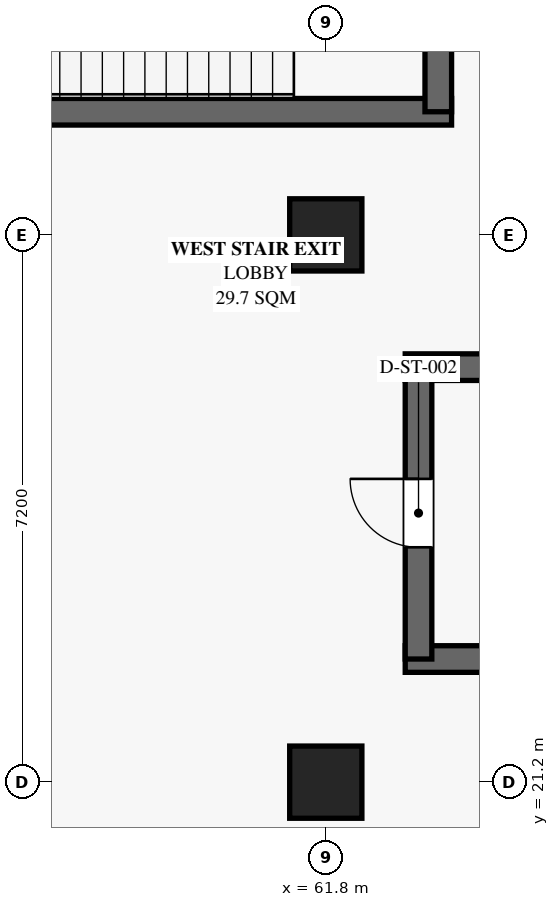
"""IFC4 building model, lengths in metres.
Left out: names, types, materials, properties, quantities, classifications, styles, units other than length and angle.
Written with IfcOpenShell. Run it as: python <this file> out.ifc"""

import sys

from ifc_helpers import new_model, si_unit, direction, frame, frame_2d, origin, origin_2d, place, context, subcontext, project, spatial, rectangle, extrude, element, fill, save


model = new_model("IFC4")
c1 = context("Model", 3, precision=1e-05, world=origin(), true_north=direction((0.0, 1.0)))
c2 = subcontext(c1, "Body", "Model", "MODEL_VIEW")
j1 = project(units=[si_unit("LENGTHUNIT", "METRE"), si_unit("PLANEANGLEUNIT", "RADIAN")], contexts=[c1])
p1 = place(None, origin())
s1 = spatial("IfcSite", under=j1, at=p1, CompositionType="ELEMENT")
p2 = place(p1, origin())
s2 = spatial("IfcBuilding", under=s1, at=p2, CompositionType="ELEMENT")
p3 = place(p2, origin())
s3 = spatial("IfcBuildingStorey", under=s2, at=p3, CompositionType="ELEMENT", Elevation=0.0)
for number, where, z_axis, x_axis in (
    (1, (61.8, 21.2, 0.0), (0.0, 0.0, 1.0), (1.0, 0.0, 0.0)),
    (2, (61.8, 28.4, 0.0), (0.0, 0.0, 1.0), (1.0, 0.0, 0.0)),
):
    element("IfcColumn", number, at=place(p3, frame(where, z_axis=z_axis, x_axis=x_axis)), inside=s3, PredefinedType="COLUMN", context=c2, shape_type="SweptSolid", body=[
        extrude(rectangle(XDim=0.95, YDim=0.95, at=origin_2d()), origin(), (0.0, 0.0, 1.0), 5.4),
    ])
for number, where, z_axis, x_axis in (
    (3, (70.855, 22.82, 0.0), (0.0, 0.0, 1.0), (-1.0, 0.0, 0.0)),
    (4, (62.845, 26.66, 0.0), (0.0, 0.0, 1.0), (1.0, 0.0, 0.0)),
):
    element("IfcWall", number, at=place(p3, frame(where, z_axis=z_axis, x_axis=x_axis)), inside=s3, PredefinedType="SHEAR", context=c2, shape_type="SweptSolid", body=[
        extrude(rectangle(XDim=8.01, YDim=0.35, at=frame_2d((4.005, 0.0))), origin(), (0.0, 0.0, 1.0), 5.13),
    ])
p4 = place(p3, frame((63.02, 22.82, 0.0), z_axis=(0.0, 0.0, 1.0), x_axis=(0.0, 1.0, 0.0)))
e5 = element("IfcWall", 5, at=p4, inside=s3, PredefinedType="SHEAR", context=c2, shape_type="SweptSolid", body=[
    extrude(rectangle(XDim=3.84, YDim=0.35, at=frame_2d((1.92, 0.0))), origin(), (0.0, 0.0, 1.0), 5.13),
])
p5 = place(p4, frame((1.47, 0.0, 0.0)))
e6 = element("IfcOpeningElement", 6, at=p5, cuts=e5, PredefinedType="OPENING", context=c2, shape_type="SweptSolid", body=[
    extrude(rectangle(XDim=0.9, YDim=2.18, at=frame_2d((0.45, 1.09))), frame((0.0, 0.185, 0.0), z_axis=(0.0, -1.0, 0.0), x_axis=(1.0, 0.0, 0.0)), (0.0, 0.0, 1.0), 0.37),
])
p6 = place(p3, frame((63.455, 30.02, 0.0), z_axis=(0.0, 0.0, 1.0), x_axis=(-1.0, 0.0, 0.0)))
e7 = element("IfcWall", 7, at=p6, inside=s3, PredefinedType="SHEAR", context=c2, shape_type="SweptSolid", body=[
    extrude(rectangle(XDim=8.01, YDim=0.35, at=frame_2d((4.005, 0.0))), origin(), (0.0, 0.0, 1.0), 5.13),
])
p7 = place(p3, frame((63.28, 33.86, 0.0), z_axis=(0.0, 0.0, 1.0), x_axis=(0.0, -1.0, 0.0)))
e8 = element("IfcWall", 8, at=p7, inside=s3, PredefinedType="SHEAR", context=c2, shape_type="SweptSolid", body=[
    extrude(rectangle(XDim=3.84, YDim=0.35, at=frame_2d((1.92, 0.0))), origin(), (0.0, 0.0, 1.0), 5.13),
])
p8 = place(p5, origin())
e9 = element("IfcDoor", 9, at=p8, inside=s3, OperationType="SINGLE_SWING_RIGHT", PredefinedType="DOOR", context=c2, shape_type="SweptSolid", body=[
    extrude(rectangle(XDim=0.9, YDim=2.18, at=frame_2d((0.45, 1.09))), frame((0.0, 0.025, 0.0), z_axis=(0.0, -1.0, 0.0), x_axis=(1.0, 0.0, 0.0)), (0.0, 0.0, 1.0), 0.05),
])
fill(e6, e9)
save(model, sys.argv[1])
